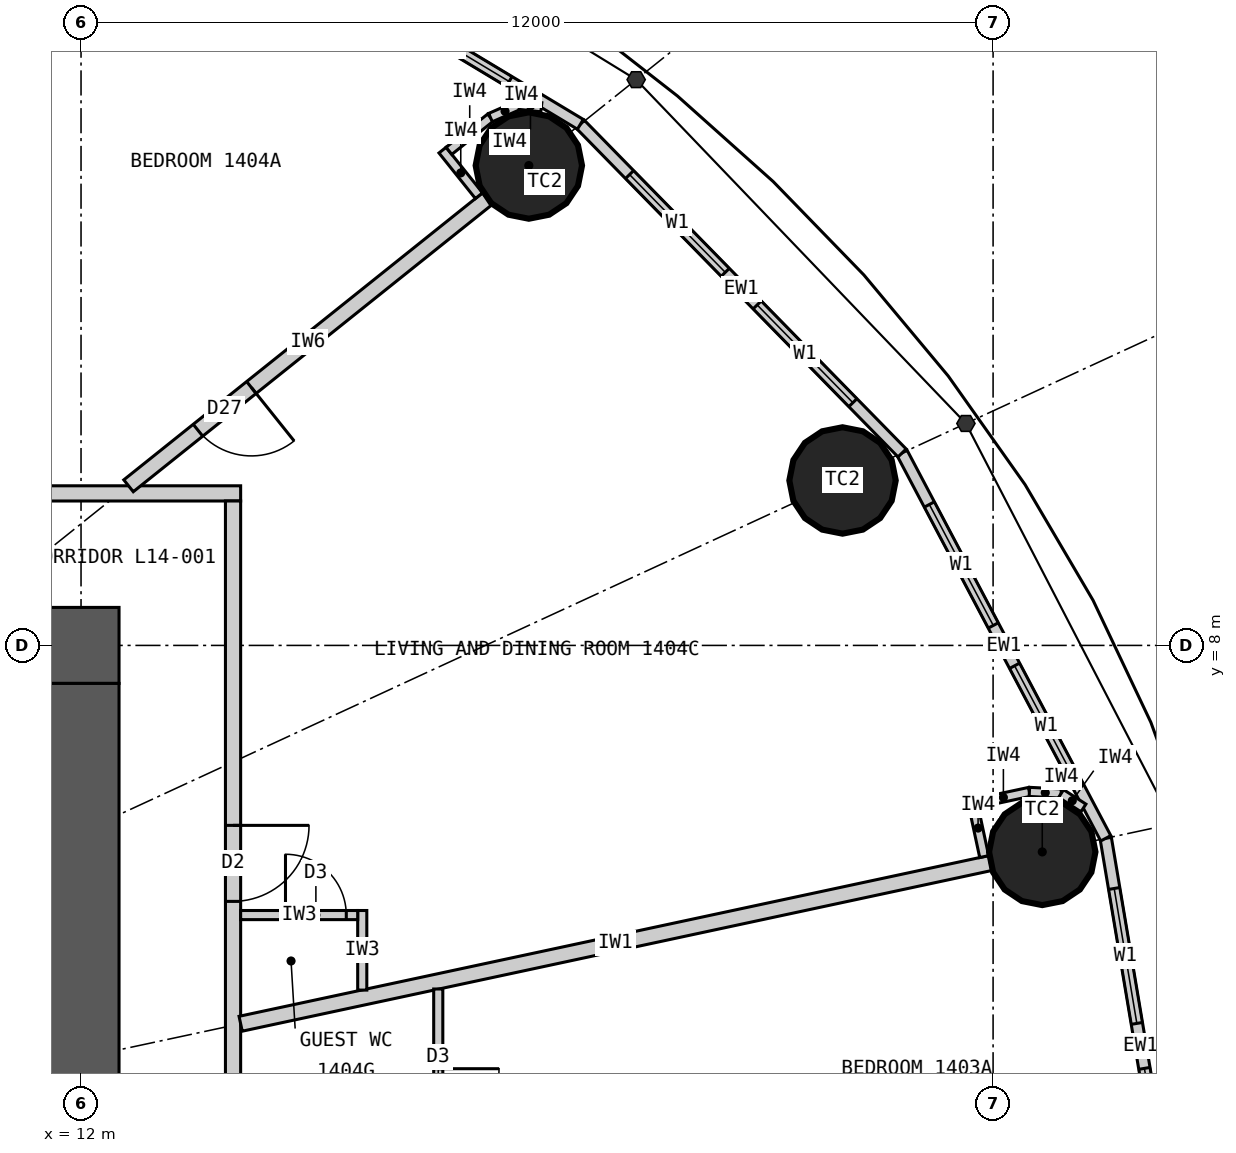
"""IFC4 building model, lengths in metres.
Left out: names, types, materials, properties, quantities, classifications, styles, units other than length and angle.
Written with IfcOpenShell. Run it as: python <this file> out.ifc"""

import sys

from ifc_helpers import new_model, si_unit, direction, frame, frame_2d, origin, origin_2d, place, context, subcontext, project, spatial, rectangle, circle, extrude, element, fill, save


model = new_model("IFC4")
c1 = context("Model", 3, precision=1e-05, world=origin(), true_north=direction((0.0, 1.0)))
c2 = subcontext(c1, "Body", "Model", "MODEL_VIEW")
j1 = project(units=[si_unit("LENGTHUNIT", "METRE"), si_unit("PLANEANGLEUNIT", "RADIAN")], contexts=[c1])
p1 = place(None, origin())
s1 = spatial("IfcSite", under=j1, at=p1, CompositionType="ELEMENT")
p2 = place(p1, origin())
s2 = spatial("IfcBuilding", under=s1, at=p2, CompositionType="ELEMENT")
p3 = place(p2, frame((0.0, 0.0, 60.6)))
s3 = spatial("IfcBuildingStorey", under=s2, at=p3, CompositionType="ELEMENT", Elevation=60.6)
for number, where, z_axis, x_axis in (
    (1, (24.647, 5.283, 0.0), (0.0, 0.0, 1.0), (1.0, 0.0, 0.0)),
    (2, (22.019, 10.17, 0.0), (0.0, 0.0, 1.0), (1.0, 0.0, 0.0)),
    (3, (17.892, 14.313, 0.0), (0.0, 0.0, 1.0), (1.0, 0.0, 0.0)),
):
    element("IfcColumn", number, at=place(p3, frame(where, z_axis=z_axis, x_axis=x_axis)), inside=s3, PredefinedType="COLUMN", context=c2, shape_type="SweptSolid", body=[
        extrude(circle(Radius=0.7, at=origin_2d()), origin(), (0.0, 0.0, 1.0), 3.3),
    ])
p4 = place(p3, frame((-12.5, 8.0, 0.0), z_axis=(0.0, 0.0, 1.0), x_axis=(1.0, 0.0, 0.0)))
e4 = element("IfcWall", 4, at=p4, inside=s3, PredefinedType="SHEAR", context=c2, shape_type="SweptSolid", body=[
    extrude(rectangle(XDim=25.0, YDim=1.0, at=frame_2d((12.5, 0.0))), origin(), (0.0, 0.0, 1.0), 3.3),
])
p5 = place(p4, frame((11.2, 0.0, 0.0)))
e5 = element("IfcOpeningElement", 5, at=p5, cuts=e4, PredefinedType="OPENING", context=c2, shape_type="SweptSolid", body=[
    extrude(rectangle(XDim=1.2, YDim=2.2, at=frame_2d((0.6, 1.1))), frame((0.0, 0.51, 0.0), z_axis=(0.0, -1.0, 0.0), x_axis=(1.0, 0.0, 0.0)), (0.0, 0.0, 1.0), 1.02),
])
p6 = place(p4, frame((18.8, 0.0, 0.0)))
e6 = element("IfcOpeningElement", 6, at=p6, cuts=e4, PredefinedType="OPENING", context=c2, shape_type="SweptSolid", body=[
    extrude(rectangle(XDim=0.9, YDim=2.2, at=frame_2d((0.45, 1.1))), frame((0.0, 0.51, 0.0), z_axis=(0.0, -1.0, 0.0), x_axis=(1.0, 0.0, 0.0)), (0.0, 0.0, 1.0), 1.02),
])
p7 = place(p3, frame((12.0, -7.5, 0.0), z_axis=(0.0, 0.0, 1.0), x_axis=(0.0, 1.0, 0.0)))
e7 = element("IfcWall", 7, at=p7, inside=s3, PredefinedType="SHEAR", context=c2, shape_type="SweptSolid", body=[
    extrude(rectangle(XDim=15.0, YDim=1.0, at=frame_2d((7.5, 0.0))), origin(), (0.0, 0.0, 1.0), 3.3),
])
p8 = place(p7, frame((6.6, 0.0, 0.0)))
e8 = element("IfcOpeningElement", 8, at=p8, cuts=e7, PredefinedType="OPENING", context=c2, shape_type="SweptSolid", body=[
    extrude(rectangle(XDim=1.8, YDim=2.2, at=frame_2d((0.9, 1.1))), frame((0.0, 0.51, 0.0), z_axis=(0.0, -1.0, 0.0), x_axis=(1.0, 0.0, 0.0)), (0.0, 0.0, 1.0), 1.02),
])
p9 = place(p3, frame((26.4, 0.0, 0.0), z_axis=(0.0, 0.0, 1.0), x_axis=(-0.165642551694, 0.986185857264, 0.0)))
e9 = element("IfcWall", 9, at=p9, inside=s3, PredefinedType="ELEMENTEDWALL", context=c2, shape_type="SweptSolid", body=[
    extrude(rectangle(XDim=5.539, YDim=0.15, at=frame_2d((2.77, 0.0))), origin(), (0.0, 0.0, 1.0), 3.12),
])
p10 = place(p9, frame((0.669, 0.0, 0.9)))
e10 = element("IfcOpeningElement", 10, at=p10, cuts=e9, PredefinedType="OPENING", context=c2, shape_type="SweptSolid", body=[
    extrude(rectangle(XDim=1.8, YDim=1.9, at=frame_2d((0.9, 0.95))), frame((0.0, 0.085, 0.0), z_axis=(0.0, -1.0, 0.0), x_axis=(1.0, 0.0, 0.0)), (0.0, 0.0, 1.0), 0.17),
])
p11 = place(p9, frame((3.07, 0.0, 0.9)))
e11 = element("IfcOpeningElement", 11, at=p11, cuts=e9, PredefinedType="OPENING", context=c2, shape_type="SweptSolid", body=[
    extrude(rectangle(XDim=1.8, YDim=1.9, at=frame_2d((0.9, 0.95))), frame((0.0, 0.085, 0.0), z_axis=(0.0, -1.0, 0.0), x_axis=(1.0, 0.0, 0.0)), (0.0, 0.0, 1.0), 0.17),
])
p12 = place(p3, frame((25.482, 5.462, 0.0), z_axis=(0.0, 0.0, 1.0), x_axis=(-0.467296867008, 0.884100468321, 0.0)))
e12 = element("IfcWall", 12, at=p12, inside=s3, PredefinedType="ELEMENTEDWALL", context=c2, shape_type="SweptSolid", body=[
    extrude(rectangle(XDim=5.734, YDim=0.15, at=frame_2d((2.867, 0.0))), origin(), (0.0, 0.0, 1.0), 3.12),
])
p13 = place(p12, frame((0.767, 0.0, 0.9)))
e13 = element("IfcOpeningElement", 13, at=p13, cuts=e12, PredefinedType="OPENING", context=c2, shape_type="SweptSolid", body=[
    extrude(rectangle(XDim=1.8, YDim=1.9, at=frame_2d((0.9, 0.95))), frame((0.0, 0.085, 0.0), z_axis=(0.0, -1.0, 0.0), x_axis=(1.0, 0.0, 0.0)), (0.0, 0.0, 1.0), 0.17),
])
p14 = place(p12, frame((3.167, 0.0, 0.9)))
e14 = element("IfcOpeningElement", 14, at=p14, cuts=e12, PredefinedType="OPENING", context=c2, shape_type="SweptSolid", body=[
    extrude(rectangle(XDim=1.8, YDim=1.9, at=frame_2d((0.9, 0.95))), frame((0.0, 0.085, 0.0), z_axis=(0.0, -1.0, 0.0), x_axis=(1.0, 0.0, 0.0)), (0.0, 0.0, 1.0), 0.17),
])
p15 = place(p3, frame((22.803, 10.532, 0.0), z_axis=(0.0, 0.0, 1.0), x_axis=(-0.699602905915, 0.714531856557, 0.0)))
e15 = element("IfcWall", 15, at=p15, inside=s3, PredefinedType="ELEMENTEDWALL", context=c2, shape_type="SweptSolid", body=[
    extrude(rectangle(XDim=6.051, YDim=0.15, at=frame_2d((3.025, 0.0))), origin(), (0.0, 0.0, 1.0), 3.12),
])
p16 = place(p15, frame((0.926, 0.0, 0.9)))
e16 = element("IfcOpeningElement", 16, at=p16, cuts=e15, PredefinedType="OPENING", context=c2, shape_type="SweptSolid", body=[
    extrude(rectangle(XDim=1.8, YDim=1.9, at=frame_2d((0.9, 0.95))), frame((0.0, 0.085, 0.0), z_axis=(0.0, -1.0, 0.0), x_axis=(1.0, 0.0, 0.0)), (0.0, 0.0, 1.0), 0.17),
])
p17 = place(p15, frame((3.325, 0.0, 0.9)))
e17 = element("IfcOpeningElement", 17, at=p17, cuts=e15, PredefinedType="OPENING", context=c2, shape_type="SweptSolid", body=[
    extrude(rectangle(XDim=1.8, YDim=1.9, at=frame_2d((0.9, 0.95))), frame((0.0, 0.085, 0.0), z_axis=(0.0, -1.0, 0.0), x_axis=(1.0, 0.0, 0.0)), (0.0, 0.0, 1.0), 0.17),
])
p18 = place(p3, frame((18.57, 14.856, 0.0), z_axis=(0.0, 0.0, 1.0), x_axis=(-0.856983180864, 0.515344377787, 0.0)))
e18 = element("IfcWall", 18, at=p18, inside=s3, PredefinedType="ELEMENTEDWALL", context=c2, shape_type="SweptSolid", body=[
    extrude(rectangle(XDim=6.386, YDim=0.15, at=frame_2d((3.193, 0.0))), origin(), (0.0, 0.0, 1.0), 3.12),
])
p19 = place(p18, frame((1.093, 0.0, 0.9)))
e19 = element("IfcOpeningElement", 19, at=p19, cuts=e18, PredefinedType="OPENING", context=c2, shape_type="SweptSolid", body=[
    extrude(rectangle(XDim=1.8, YDim=1.9, at=frame_2d((0.9, 0.95))), frame((0.0, 0.085, 0.0), z_axis=(0.0, -1.0, 0.0), x_axis=(1.0, 0.0, 0.0)), (0.0, 0.0, 1.0), 0.17),
])
p20 = place(p18, frame((3.493, 0.0, 0.9)))
e20 = element("IfcOpeningElement", 20, at=p20, cuts=e18, PredefinedType="OPENING", context=c2, shape_type="SweptSolid", body=[
    extrude(rectangle(XDim=1.8, YDim=1.9, at=frame_2d((0.9, 0.95))), frame((0.0, 0.085, 0.0), z_axis=(0.0, -1.0, 0.0), x_axis=(1.0, 0.0, 0.0)), (0.0, 0.0, 1.0), 0.17),
])
p21 = place(p3, frame((-14.1, 10.0, 0.0), z_axis=(0.0, 0.0, 1.0), x_axis=(1.0, 0.0, 0.0)))
e21 = element("IfcWall", 21, at=p21, inside=s3, PredefinedType="PARTITIONING", context=c2, shape_type="SweptSolid", body=[
    extrude(rectangle(XDim=28.2, YDim=0.2, at=frame_2d((14.1, 0.0))), origin(), (0.0, 0.0, 1.0), 3.12),
])
p22 = place(p21, frame((18.529, 0.0, 0.0)))
e22 = element("IfcOpeningElement", 22, at=p22, cuts=e21, PredefinedType="OPENING", context=c2, shape_type="SweptSolid", body=[
    extrude(rectangle(XDim=1.0, YDim=2.2, at=frame_2d((0.5, 1.1))), frame((0.0, 0.11, 0.0), z_axis=(0.0, -1.0, 0.0), x_axis=(1.0, 0.0, 0.0)), (0.0, 0.0, 1.0), 0.22),
])
p23 = place(p21, frame((14.623, 0.0, 0.0)))
e23 = element("IfcOpeningElement", 23, at=p23, cuts=e21, PredefinedType="OPENING", context=c2, shape_type="SweptSolid", body=[
    extrude(rectangle(XDim=1.0, YDim=2.2, at=frame_2d((0.5, 1.1))), frame((0.0, 0.11, 0.0), z_axis=(0.0, -1.0, 0.0), x_axis=(1.0, 0.0, 0.0)), (0.0, 0.0, 1.0), 0.22),
])
p24 = place(p21, frame((11.24, 0.0, 0.0)))
e24 = element("IfcOpeningElement", 24, at=p24, cuts=e21, PredefinedType="OPENING", context=c2, shape_type="SweptSolid", body=[
    extrude(rectangle(XDim=1.0, YDim=2.2, at=frame_2d((0.5, 1.1))), frame((0.0, 0.11, 0.0), z_axis=(0.0, -1.0, 0.0), x_axis=(1.0, 0.0, 0.0)), (0.0, 0.0, 1.0), 0.22),
])
p25 = place(p21, frame((8.671, 0.0, 0.0)))
e25 = element("IfcOpeningElement", 25, at=p25, cuts=e21, PredefinedType="OPENING", context=c2, shape_type="SweptSolid", body=[
    extrude(rectangle(XDim=1.0, YDim=2.2, at=frame_2d((0.5, 1.1))), frame((0.0, 0.11, 0.0), z_axis=(0.0, -1.0, 0.0), x_axis=(1.0, 0.0, 0.0)), (0.0, 0.0, 1.0), 0.22),
])
p26 = place(p21, frame((2.801, 0.0, 0.0)))
e26 = element("IfcOpeningElement", 26, at=p26, cuts=e21, PredefinedType="OPENING", context=c2, shape_type="SweptSolid", body=[
    extrude(rectangle(XDim=1.0, YDim=2.2, at=frame_2d((0.5, 1.1))), frame((0.0, 0.11, 0.0), z_axis=(0.0, -1.0, 0.0), x_axis=(1.0, 0.0, 0.0)), (0.0, 0.0, 1.0), 0.22),
])
p27 = place(p3, frame((14.0, -9.9, 0.0), z_axis=(0.0, 0.0, 1.0), x_axis=(0.0, 1.0, 0.0)))
e27 = element("IfcWall", 27, at=p27, inside=s3, PredefinedType="PARTITIONING", context=c2, shape_type="SweptSolid", body=[
    extrude(rectangle(XDim=19.8, YDim=0.2, at=frame_2d((9.9, 0.0))), origin(), (0.0, 0.0, 1.0), 3.12),
])
p28 = place(p27, frame((0.103, 0.0, 0.0)))
e28 = element("IfcOpeningElement", 28, at=p28, cuts=e27, PredefinedType="OPENING", context=c2, shape_type="SweptSolid", body=[
    extrude(rectangle(XDim=1.0, YDim=2.2, at=frame_2d((0.5, 1.1))), frame((0.0, 0.11, 0.0), z_axis=(0.0, -1.0, 0.0), x_axis=(1.0, 0.0, 0.0)), (0.0, 0.0, 1.0), 0.22),
])
p29 = place(p27, frame((5.248, 0.0, 0.0)))
e29 = element("IfcOpeningElement", 29, at=p29, cuts=e27, PredefinedType="OPENING", context=c2, shape_type="SweptSolid", body=[
    extrude(rectangle(XDim=1.0, YDim=2.2, at=frame_2d((0.5, 1.1))), frame((0.0, 0.11, 0.0), z_axis=(0.0, -1.0, 0.0), x_axis=(1.0, 0.0, 0.0)), (0.0, 0.0, 1.0), 0.22),
])
p30 = place(p27, frame((8.438, 0.0, 0.0)))
e30 = element("IfcOpeningElement", 30, at=p30, cuts=e27, PredefinedType="OPENING", context=c2, shape_type="SweptSolid", body=[
    extrude(rectangle(XDim=1.0, YDim=2.2, at=frame_2d((0.5, 1.1))), frame((0.0, 0.11, 0.0), z_axis=(0.0, -1.0, 0.0), x_axis=(1.0, 0.0, 0.0)), (0.0, 0.0, 1.0), 0.22),
])
p31 = place(p27, frame((14.532, 0.0, 0.0)))
e31 = element("IfcOpeningElement", 31, at=p31, cuts=e27, PredefinedType="OPENING", context=c2, shape_type="SweptSolid", body=[
    extrude(rectangle(XDim=1.0, YDim=2.2, at=frame_2d((0.5, 1.1))), frame((0.0, 0.11, 0.0), z_axis=(0.0, -1.0, 0.0), x_axis=(1.0, 0.0, 0.0)), (0.0, 0.0, 1.0), 0.22),
])
p32 = place(p3, frame((14.1, 3.022, 0.0), z_axis=(0.0, 0.0, 1.0), x_axis=(0.977790014929, 0.209586943072, 0.0)))
e32 = element("IfcWall", 32, at=p32, inside=s3, PredefinedType="PARTITIONING", context=c2, shape_type="SweptSolid", body=[
    extrude(rectangle(XDim=10.087, YDim=0.2, at=frame_2d((5.043, 0.0))), origin(), (0.0, 0.0, 1.0), 2.32),
])
p33 = place(p3, frame((12.625, 10.1, 0.0), z_axis=(0.0, 0.0, 1.0), x_axis=(0.780892451574, 0.624665493744, 0.0)))
e33 = element("IfcWall", 33, at=p33, inside=s3, PredefinedType="PARTITIONING", context=c2, shape_type="SweptSolid", body=[
    extrude(rectangle(XDim=6.045, YDim=0.2, at=frame_2d((3.022, 0.0))), origin(), (0.0, 0.0, 1.0), 2.32),
])
p34 = place(p33, frame((1.17, 0.0, 0.0)))
e34 = element("IfcOpeningElement", 34, at=p34, cuts=e33, PredefinedType="OPENING", context=c2, shape_type="SweptSolid", body=[
    extrude(rectangle(XDim=0.9, YDim=2.1, at=frame_2d((0.45, 1.05))), frame((0.0, 0.11, 0.0), z_axis=(0.0, -1.0, 0.0), x_axis=(1.0, 0.0, 0.0)), (0.0, 0.0, 1.0), 0.22),
])
p35 = place(p3, frame((7.289, 10.1, 0.0), z_axis=(0.0, 0.0, 1.0), x_axis=(0.585198353053, 0.810890182197, 0.0)))
e35 = element("IfcWall", 35, at=p35, inside=s3, PredefinedType="PARTITIONING", context=c2, shape_type="SweptSolid", body=[
    extrude(rectangle(XDim=8.36, YDim=0.2, at=frame_2d((4.18, 0.0))), origin(), (0.0, 0.0, 1.0), 2.32),
])
p36 = place(p3, frame((16.7, 3.48, 0.0), z_axis=(0.0, 0.0, 1.0), x_axis=(0.0, -1.0, 0.0)))
e36 = element("IfcWall", 36, at=p36, inside=s3, PredefinedType="PARTITIONING", context=c2, shape_type="SweptSolid", body=[
    extrude(rectangle(XDim=2.897, YDim=0.12, at=frame_2d((1.449, 0.0))), origin(), (0.0, 0.0, 1.0), 3.12),
])
p37 = place(p36, frame((1.049, 0.0, 0.0)))
e37 = element("IfcOpeningElement", 37, at=p37, cuts=e36, PredefinedType="OPENING", context=c2, shape_type="SweptSolid", body=[
    extrude(rectangle(XDim=0.8, YDim=2.1, at=frame_2d((0.4, 1.05))), frame((0.0, 0.07, 0.0), z_axis=(0.0, -1.0, 0.0), x_axis=(1.0, 0.0, 0.0)), (0.0, 0.0, 1.0), 0.14),
])
p38 = place(p3, frame((15.7, 3.465, 0.0), z_axis=(0.0, 0.0, 1.0), x_axis=(0.0, 1.0, 0.0)))
e38 = element("IfcWall", 38, at=p38, inside=s3, PredefinedType="PARTITIONING", context=c2, shape_type="SweptSolid", body=[
    extrude(rectangle(XDim=1.047, YDim=0.12, at=frame_2d((0.523, 0.0))), origin(), (0.0, 0.0, 1.0), 3.12),
])
p39 = place(p3, frame((14.1, 4.452, 0.0), z_axis=(0.0, 0.0, 1.0), x_axis=(1.0, 0.0, 0.0)))
e39 = element("IfcWall", 39, at=p39, inside=s3, PredefinedType="PARTITIONING", context=c2, shape_type="SweptSolid", body=[
    extrude(rectangle(XDim=1.54, YDim=0.12, at=frame_2d((0.77, 0.0))), origin(), (0.0, 0.0, 1.0), 3.12),
])
p40 = place(p39, frame((0.59, 0.0, 0.0)))
e40 = element("IfcOpeningElement", 40, at=p40, cuts=e39, PredefinedType="OPENING", context=c2, shape_type="SweptSolid", body=[
    extrude(rectangle(XDim=0.8, YDim=2.1, at=frame_2d((0.4, 1.05))), frame((0.0, 0.07, 0.0), z_axis=(0.0, -1.0, 0.0), x_axis=(1.0, 0.0, 0.0)), (0.0, 0.0, 1.0), 0.14),
])
p41 = place(p3, frame((23.883, 5.222, 0.0), z_axis=(0.0, 0.0, 1.0), x_axis=(-0.209311842415, 0.977848941619, 0.0)))
e41 = element("IfcWall", 41, at=p41, inside=s3, PredefinedType="PARTITIONING", context=c2, shape_type="SweptSolid", body=[
    extrude(rectangle(XDim=0.768, YDim=0.12, at=frame_2d((0.384, 0.0))), origin(), (0.0, 0.0, 1.0), 3.12),
])
p42 = place(p3, frame((23.793, 5.926, 0.0), z_axis=(0.0, 0.0, 1.0), x_axis=(0.977792206673, 0.209576717621, 0.0)))
e42 = element("IfcWall", 42, at=p42, inside=s3, PredefinedType="PARTITIONING", context=c2, shape_type="SweptSolid", body=[
    extrude(rectangle(XDim=0.7, YDim=0.12, at=frame_2d((0.35, 0.0))), origin(), (0.0, 0.0, 1.0), 3.12),
])
p43 = place(p3, frame((24.478, 6.073, 0.0), z_axis=(0.0, 0.0, 1.0), x_axis=(0.998708262812, -0.05081147302, 0.0)))
e43 = element("IfcWall", 43, at=p43, inside=s3, PredefinedType="PARTITIONING", context=c2, shape_type="SweptSolid", body=[
    extrude(rectangle(XDim=0.418, YDim=0.12, at=frame_2d((0.209, 0.0))), origin(), (0.0, 0.0, 1.0), 3.12),
])
p44 = place(p3, frame((24.895, 6.052, 0.0), z_axis=(0.0, 0.0, 1.0), x_axis=(0.839495197275, -0.54336710772, 0.0)))
e44 = element("IfcWall", 44, at=p44, inside=s3, PredefinedType="PARTITIONING", context=c2, shape_type="SweptSolid", body=[
    extrude(rectangle(XDim=0.35, YDim=0.12, at=frame_2d((0.175, 0.0))), origin(), (0.0, 0.0, 1.0), 3.12),
])
p45 = place(p3, frame((17.236, 13.917, 0.0), z_axis=(0.0, 0.0, 1.0), x_axis=(-0.624695047554, 0.780868809443, 0.0)))
e45 = element("IfcWall", 45, at=p45, inside=s3, PredefinedType="PARTITIONING", context=c2, shape_type="SweptSolid", body=[
    extrude(rectangle(XDim=0.768, YDim=0.12, at=frame_2d((0.384, 0.0))), origin(), (0.0, 0.0, 1.0), 3.12),
])
p46 = place(p3, frame((16.841, 14.507, 0.0), z_axis=(0.0, 0.0, 1.0), x_axis=(0.780902834923, 0.62465251333, 0.0)))
e46 = element("IfcWall", 46, at=p46, inside=s3, PredefinedType="PARTITIONING", context=c2, shape_type="SweptSolid", body=[
    extrude(rectangle(XDim=0.7, YDim=0.12, at=frame_2d((0.35, 0.0))), origin(), (0.0, 0.0, 1.0), 3.12),
])
p47 = place(p3, frame((17.387, 14.944, 0.0), z_axis=(0.0, 0.0, 1.0), x_axis=(0.916036698064, 0.401094462441, 0.0)))
e47 = element("IfcWall", 47, at=p47, inside=s3, PredefinedType="PARTITIONING", context=c2, shape_type="SweptSolid", body=[
    extrude(rectangle(XDim=0.418, YDim=0.12, at=frame_2d((0.209, 0.0))), origin(), (0.0, 0.0, 1.0), 3.12),
])
p48 = place(p3, frame((17.77, 15.112, 0.0), z_axis=(0.0, 0.0, 1.0), x_axis=(0.993904401174, -0.110245368731, 0.0)))
e48 = element("IfcWall", 48, at=p48, inside=s3, PredefinedType="PARTITIONING", context=c2, shape_type="SweptSolid", body=[
    extrude(rectangle(XDim=0.288, YDim=0.12, at=frame_2d((0.144, 0.0))), origin(), (0.0, 0.0, 1.0), 3.12),
])
p49 = place(p10, origin())
e49 = element("IfcWindow", 49, at=p49, inside=s3, PartitioningType="SINGLE_PANEL", PredefinedType="WINDOW", context=c2, shape_type="SweptSolid", body=[
    extrude(rectangle(XDim=1.8, YDim=1.9, at=frame_2d((0.9, 0.95))), frame((0.0, 0.03, 0.0), z_axis=(0.0, -1.0, 0.0), x_axis=(1.0, 0.0, 0.0)), (0.0, 0.0, 1.0), 0.06),
])
fill(e10, e49)
p50 = place(p11, origin())
e50 = element("IfcWindow", 50, at=p50, inside=s3, PartitioningType="SINGLE_PANEL", PredefinedType="WINDOW", context=c2, shape_type="SweptSolid", body=[
    extrude(rectangle(XDim=1.8, YDim=1.9, at=frame_2d((0.9, 0.95))), frame((0.0, 0.03, 0.0), z_axis=(0.0, -1.0, 0.0), x_axis=(1.0, 0.0, 0.0)), (0.0, 0.0, 1.0), 0.06),
])
fill(e11, e50)
p51 = place(p13, origin())
e51 = element("IfcWindow", 51, at=p51, inside=s3, PartitioningType="SINGLE_PANEL", PredefinedType="WINDOW", context=c2, shape_type="SweptSolid", body=[
    extrude(rectangle(XDim=1.8, YDim=1.9, at=frame_2d((0.9, 0.95))), frame((0.0, 0.03, 0.0), z_axis=(0.0, -1.0, 0.0), x_axis=(1.0, 0.0, 0.0)), (0.0, 0.0, 1.0), 0.06),
])
fill(e13, e51)
p52 = place(p14, origin())
e52 = element("IfcWindow", 52, at=p52, inside=s3, PartitioningType="SINGLE_PANEL", PredefinedType="WINDOW", context=c2, shape_type="SweptSolid", body=[
    extrude(rectangle(XDim=1.8, YDim=1.9, at=frame_2d((0.9, 0.95))), frame((0.0, 0.03, 0.0), z_axis=(0.0, -1.0, 0.0), x_axis=(1.0, 0.0, 0.0)), (0.0, 0.0, 1.0), 0.06),
])
fill(e14, e52)
p53 = place(p16, origin())
e53 = element("IfcWindow", 53, at=p53, inside=s3, PartitioningType="SINGLE_PANEL", PredefinedType="WINDOW", context=c2, shape_type="SweptSolid", body=[
    extrude(rectangle(XDim=1.8, YDim=1.9, at=frame_2d((0.9, 0.95))), frame((0.0, 0.03, 0.0), z_axis=(0.0, -1.0, 0.0), x_axis=(1.0, 0.0, 0.0)), (0.0, 0.0, 1.0), 0.06),
])
fill(e16, e53)
p54 = place(p17, origin())
e54 = element("IfcWindow", 54, at=p54, inside=s3, PartitioningType="SINGLE_PANEL", PredefinedType="WINDOW", context=c2, shape_type="SweptSolid", body=[
    extrude(rectangle(XDim=1.8, YDim=1.9, at=frame_2d((0.9, 0.95))), frame((0.0, 0.03, 0.0), z_axis=(0.0, -1.0, 0.0), x_axis=(1.0, 0.0, 0.0)), (0.0, 0.0, 1.0), 0.06),
])
fill(e17, e54)
p55 = place(p19, origin())
e55 = element("IfcWindow", 55, at=p55, inside=s3, PartitioningType="SINGLE_PANEL", PredefinedType="WINDOW", context=c2, shape_type="SweptSolid", body=[
    extrude(rectangle(XDim=1.8, YDim=1.9, at=frame_2d((0.9, 0.95))), frame((0.0, 0.03, 0.0), z_axis=(0.0, -1.0, 0.0), x_axis=(1.0, 0.0, 0.0)), (0.0, 0.0, 1.0), 0.06),
])
fill(e19, e55)
p56 = place(p37, origin())
e56 = element("IfcDoor", 56, at=p56, inside=s3, OperationType="SINGLE_SWING_LEFT", PredefinedType="DOOR", context=c2, shape_type="SweptSolid", body=[
    extrude(rectangle(XDim=0.8, YDim=2.1, at=frame_2d((0.4, 1.05))), frame((0.0, 0.025, 0.0), z_axis=(0.0, -1.0, 0.0), x_axis=(1.0, 0.0, 0.0)), (0.0, 0.0, 1.0), 0.05),
])
fill(e37, e56)
p57 = place(p40, origin())
e57 = element("IfcDoor", 57, at=p57, inside=s3, OperationType="SINGLE_SWING_LEFT", PredefinedType="DOOR", context=c2, shape_type="SweptSolid", body=[
    extrude(rectangle(XDim=0.8, YDim=2.1, at=frame_2d((0.4, 1.05))), frame((0.0, 0.025, 0.0), z_axis=(0.0, -1.0, 0.0), x_axis=(1.0, 0.0, 0.0)), (0.0, 0.0, 1.0), 0.05),
])
fill(e40, e57)
p58 = place(p31, origin())
e58 = element("IfcDoor", 58, at=p58, inside=s3, OperationType="SINGLE_SWING_RIGHT", PredefinedType="DOOR", context=c2, shape_type="SweptSolid", body=[
    extrude(rectangle(XDim=1.0, YDim=2.2, at=frame_2d((0.5, 1.1))), frame((0.0, 0.025, 0.0), z_axis=(0.0, -1.0, 0.0), x_axis=(1.0, 0.0, 0.0)), (0.0, 0.0, 1.0), 0.05),
])
fill(e31, e58)
p59 = place(p34, origin())
e59 = element("IfcDoor", 59, at=p59, inside=s3, OperationType="SINGLE_SWING_RIGHT", PredefinedType="DOOR", context=c2, shape_type="SweptSolid", body=[
    extrude(rectangle(XDim=0.9, YDim=2.1, at=frame_2d((0.45, 1.05))), frame((0.0, 0.025, 0.0), z_axis=(0.0, -1.0, 0.0), x_axis=(1.0, 0.0, 0.0)), (0.0, 0.0, 1.0), 0.05),
])
fill(e34, e59)
save(model, sys.argv[1])
